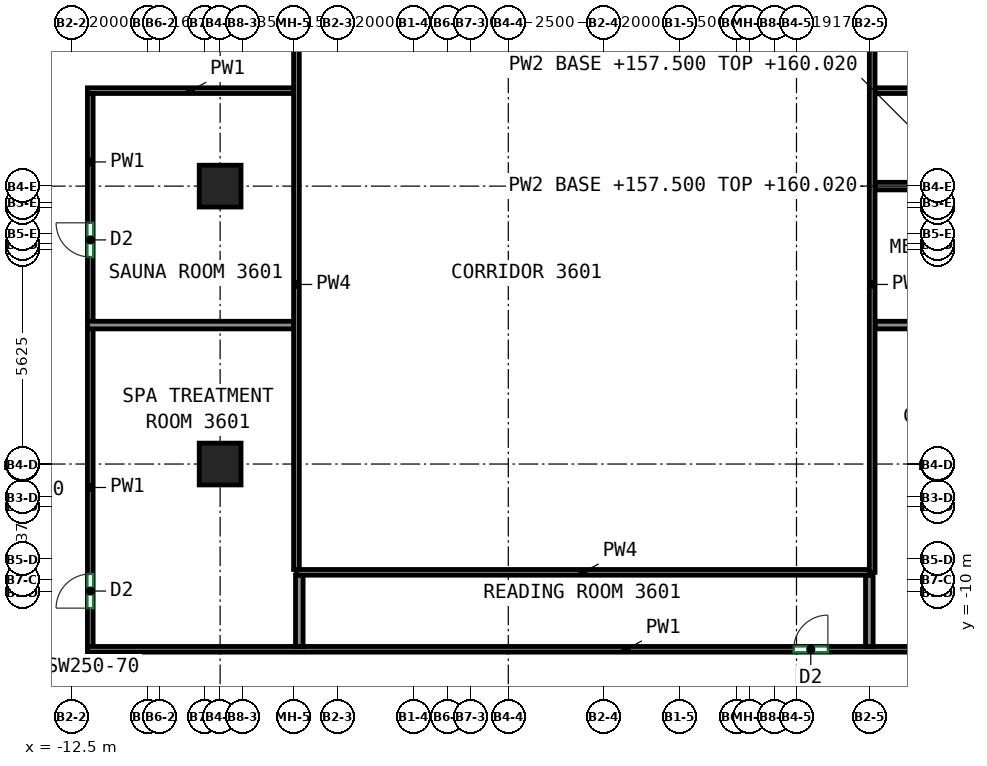
"""IFC4 building model, lengths in metres.
Left out: names, types, materials, properties, quantities, classifications, styles, units other than length and angle.
Written with IfcOpenShell. Run it as: python <this file> out.ifc"""

import sys

from ifc_helpers import new_model, si_unit, direction, frame, frame_2d, origin, origin_2d, place, context, subcontext, project, spatial, rectangle, extrude, source, transform, mapped, element, fill, save


model = new_model("IFC4")
c1 = context("Model", 3, precision=1e-05, world=origin(), true_north=direction((0.0, 1.0)))
c2 = subcontext(c1, "Body", "Model", "MODEL_VIEW")
j1 = project(units=[si_unit("LENGTHUNIT", "METRE"), si_unit("PLANEANGLEUNIT", "RADIAN")], contexts=[c1])
p1 = place(None, origin())
s1 = spatial("IfcSite", under=j1, at=p1, CompositionType="ELEMENT")
p2 = place(p1, origin())
s2 = spatial("IfcBuilding", under=s1, at=p2, CompositionType="ELEMENT")
p3 = place(p2, frame((0.0, 0.0, 157.5)))
s3 = spatial("IfcBuildingStorey", under=s2, at=p3, CompositionType="ELEMENT", Elevation=157.5)
m1 = source(origin(), c2, "Body", "SweptSolid", [
    extrude(rectangle(XDim=1.1, YDim=1.1, at=origin_2d()), origin(), (0.0, 0.0, 1.0), 3.12),
])
for number, where, z_axis, x_axis in (
    (1, (-8.583, -6.625, 0.0), (0.0, 0.0, 1.0), (1.0, 0.0, 0.0)),
    (2, (-8.583, 0.688, 0.0), (0.0, 0.0, 1.0), (1.0, 0.0, 0.0)),
):
    element("IfcColumn", number, at=place(p3, frame(where, z_axis=z_axis, x_axis=x_axis)), inside=s3, PredefinedType="COLUMN", context=c2, shape_type="MappedRepresentation", body=[
        mapped(m1, transform((0.0, 0.0, 0.0))),
    ])
p4 = place(p3, frame((-12.0, -11.425, 0.0), z_axis=(0.0, 0.0, 1.0), x_axis=(0.0, 1.0, 0.0)))
e3 = element("IfcWall", 3, at=p4, inside=s3, PredefinedType="PARTITIONING", context=c2, shape_type="SweptSolid", body=[
    extrude(rectangle(XDim=8.366, YDim=0.15, at=frame_2d((4.183, 0.0))), origin(), (0.0, 0.0, 1.0), 3.12),
])
p5 = place(p4, frame((1.008, 0.0, 0.0)))
e4 = element("IfcOpeningElement", 4, at=p5, cuts=e3, PredefinedType="OPENING", context=c2, shape_type="SweptSolid", body=[
    extrude(rectangle(XDim=0.9, YDim=2.1, at=frame_2d((0.45, 1.05))), frame((0.0, 0.085, 0.0), z_axis=(0.0, -1.0, 0.0), x_axis=(1.0, 0.0, 0.0)), (0.0, 0.0, 1.0), 0.17),
])
p6 = place(p3, frame((-12.075, -11.5, 0.0), z_axis=(0.0, 0.0, 1.0), x_axis=(1.0, 0.0, 0.0)))
e5 = element("IfcWall", 5, at=p6, inside=s3, PredefinedType="PARTITIONING", context=c2, shape_type="SweptSolid", body=[
    extrude(rectangle(XDim=28.35, YDim=0.15, at=frame_2d((14.175, 0.0))), origin(), (0.0, 0.0, 1.0), 3.12),
])
p7 = place(p6, frame((18.584, 0.0, 0.0)))
e6 = element("IfcOpeningElement", 6, at=p7, cuts=e5, PredefinedType="OPENING", context=c2, shape_type="SweptSolid", body=[
    extrude(rectangle(XDim=0.9, YDim=2.1, at=frame_2d((0.45, 1.05))), frame((0.0, 0.085, 0.0), z_axis=(0.0, -1.0, 0.0), x_axis=(1.0, 0.0, 0.0)), (0.0, 0.0, 1.0), 0.17),
])
p8 = place(p3, frame((-12.075, 3.2, 0.0), z_axis=(0.0, 0.0, 1.0), x_axis=(1.0, 0.0, 0.0)))
e7 = element("IfcWall", 7, at=p8, inside=s3, PredefinedType="PARTITIONING", context=c2, shape_type="SweptSolid", body=[
    extrude(rectangle(XDim=5.425, YDim=0.15, at=frame_2d((2.712, 0.0))), origin(), (0.0, 0.0, 1.0), 3.12),
])
p9 = place(p3, frame((-12.0, -2.879, 0.0), z_axis=(0.0, 0.0, 1.0), x_axis=(0.0, 1.0, 0.0)))
e8 = element("IfcWall", 8, at=p9, inside=s3, PredefinedType="PARTITIONING", context=c2, shape_type="SweptSolid", body=[
    extrude(rectangle(XDim=6.004, YDim=0.15, at=frame_2d((3.002, 0.0))), origin(), (0.0, 0.0, 1.0), 3.12),
])
p10 = place(p9, frame((1.701, 0.0, 0.0)))
e9 = element("IfcOpeningElement", 9, at=p10, cuts=e8, PredefinedType="OPENING", context=c2, shape_type="SweptSolid", body=[
    extrude(rectangle(XDim=0.9, YDim=2.1, at=frame_2d((0.45, 1.05))), frame((0.0, 0.085, 0.0), z_axis=(0.0, -1.0, 0.0), x_axis=(1.0, 0.0, 0.0)), (0.0, 0.0, 1.0), 0.17),
])
p11 = place(p3, frame((8.65, 3.2, 0.0), z_axis=(0.0, 0.0, 1.0), x_axis=(1.0, 0.0, 0.0)))
e10 = element("IfcWall", 10, at=p11, inside=s3, PredefinedType="PARTITIONING", context=c2, shape_type="SweptSolid", body=[
    extrude(rectangle(XDim=7.625, YDim=0.15, at=frame_2d((3.812, 0.0))), origin(), (0.0, 0.0, 1.0), 3.12),
])
p12 = place(p11, frame((5.513, 0.0, 0.0)))
e11 = element("IfcOpeningElement", 11, at=p12, cuts=e10, PredefinedType="OPENING", context=c2, shape_type="SweptSolid", body=[
    extrude(rectangle(XDim=0.9, YDim=2.1, at=frame_2d((0.45, 1.05))), frame((0.0, 0.085, 0.0), z_axis=(0.0, -1.0, 0.0), x_axis=(1.0, 0.0, 0.0)), (0.0, 0.0, 1.0), 0.17),
])
p13 = place(p3, frame((-12.073, -2.969, 0.0), z_axis=(0.0, 0.0, 1.0), x_axis=(1.0, 0.0, 0.0)))
e12 = element("IfcWall", 12, at=p13, inside=s3, PredefinedType="PARTITIONING", context=c2, shape_type="SweptSolid", body=[
    extrude(rectangle(XDim=5.423, YDim=0.2, at=frame_2d((2.711, 0.0))), origin(), (0.0, 0.0, 1.0), 3.12),
])
for number, where, z_axis, x_axis in (
    (13, (-6.5, -11.423, 0.0), (0.0, 0.0, 1.0), (0.0, 1.0, 0.0)),
    (14, (8.5, -11.423, 0.0), (0.0, 0.0, 1.0), (0.0, 1.0, 0.0)),
):
    element("IfcWall", number, at=place(p3, frame(where, z_axis=z_axis, x_axis=x_axis)), inside=s3, PredefinedType="PARTITIONING", context=c2, shape_type="SweptSolid", body=[
        extrude(rectangle(XDim=1.873, YDim=0.2, at=frame_2d((0.937, 0.0))), origin(), (0.0, 0.0, 1.0), 3.12),
    ])
p14 = place(p3, frame((8.65, -2.969, 0.0), z_axis=(0.0, 0.0, 1.0), x_axis=(1.0, 0.0, 0.0)))
e15 = element("IfcWall", 15, at=p14, inside=s3, PredefinedType="PARTITIONING", context=c2, shape_type="SweptSolid", body=[
    extrude(rectangle(XDim=7.623, YDim=0.2, at=frame_2d((3.812, 0.0))), origin(), (0.0, 0.0, 1.0), 3.12),
])
p15 = place(p3, frame((8.65, 0.688, 0.0), z_axis=(0.0, 0.0, 1.0), x_axis=(1.0, 0.0, 0.0)))
e16 = element("IfcWall", 16, at=p15, inside=s3, PredefinedType="PARTITIONING", context=c2, shape_type="SweptSolid", body=[
    extrude(rectangle(XDim=4.967, YDim=0.2, at=frame_2d((2.483, 0.0))), origin(), (0.0, 0.0, 1.0), 2.52),
])
p16 = place(p3, frame((8.5, -9.475, 0.0), z_axis=(0.0, 0.0, 1.0), x_axis=(-1.0, 0.0, 0.0)))
e17 = element("IfcWall", 17, at=p16, inside=s3, PredefinedType="PARTITIONING", context=c2, shape_type="SweptSolid", body=[
    extrude(rectangle(XDim=15.075, YDim=0.15, at=frame_2d((7.538, 0.0))), origin(), (0.0, 0.0, 1.0), 3.12),
])
p17 = place(p3, frame((-6.575, -9.4, 0.0), z_axis=(0.0, 0.0, 1.0), x_axis=(0.0, 1.0, 0.0)))
e18 = element("IfcWall", 18, at=p17, inside=s3, PredefinedType="PARTITIONING", context=c2, shape_type="SweptSolid", body=[
    extrude(rectangle(XDim=15.0, YDim=0.15, at=frame_2d((7.5, 0.0))), origin(), (0.0, 0.0, 1.0), 3.12),
])
p18 = place(p3, frame((8.575, 5.675, 0.0), z_axis=(0.0, 0.0, 1.0), x_axis=(0.0, -1.0, 0.0)))
e19 = element("IfcWall", 19, at=p18, inside=s3, PredefinedType="PARTITIONING", context=c2, shape_type="SweptSolid", body=[
    extrude(rectangle(XDim=15.15, YDim=0.15, at=frame_2d((7.575, 0.0))), origin(), (0.0, 0.0, 1.0), 3.12),
])
p19 = place(p7, origin())
e20 = element("IfcDoor", 20, at=p19, inside=s3, OperationType="SINGLE_SWING_RIGHT", PredefinedType="DOOR", context=c2, shape_type="SweptSolid", body=[
    extrude(rectangle(XDim=0.9, YDim=2.1, at=frame_2d((0.45, 1.05))), frame((0.0, 0.025, 0.0), z_axis=(0.0, -1.0, 0.0), x_axis=(1.0, 0.0, 0.0)), (0.0, 0.0, 1.0), 0.05),
])
fill(e6, e20)
p20 = place(p5, origin())
e21 = element("IfcDoor", 21, at=p20, inside=s3, OperationType="SINGLE_SWING_LEFT", PredefinedType="DOOR", context=c2, shape_type="SweptSolid", body=[
    extrude(rectangle(XDim=0.9, YDim=2.1, at=frame_2d((0.45, 1.05))), frame((0.0, 0.025, 0.0), z_axis=(0.0, -1.0, 0.0), x_axis=(1.0, 0.0, 0.0)), (0.0, 0.0, 1.0), 0.05),
])
fill(e4, e21)
p21 = place(p10, origin())
e22 = element("IfcDoor", 22, at=p21, inside=s3, OperationType="SINGLE_SWING_RIGHT", PredefinedType="DOOR", context=c2, shape_type="SweptSolid", body=[
    extrude(rectangle(XDim=0.9, YDim=2.1, at=frame_2d((0.45, 1.05))), frame((0.0, 0.025, 0.0), z_axis=(0.0, -1.0, 0.0), x_axis=(1.0, 0.0, 0.0)), (0.0, 0.0, 1.0), 0.05),
])
fill(e9, e22)
save(model, sys.argv[1])
